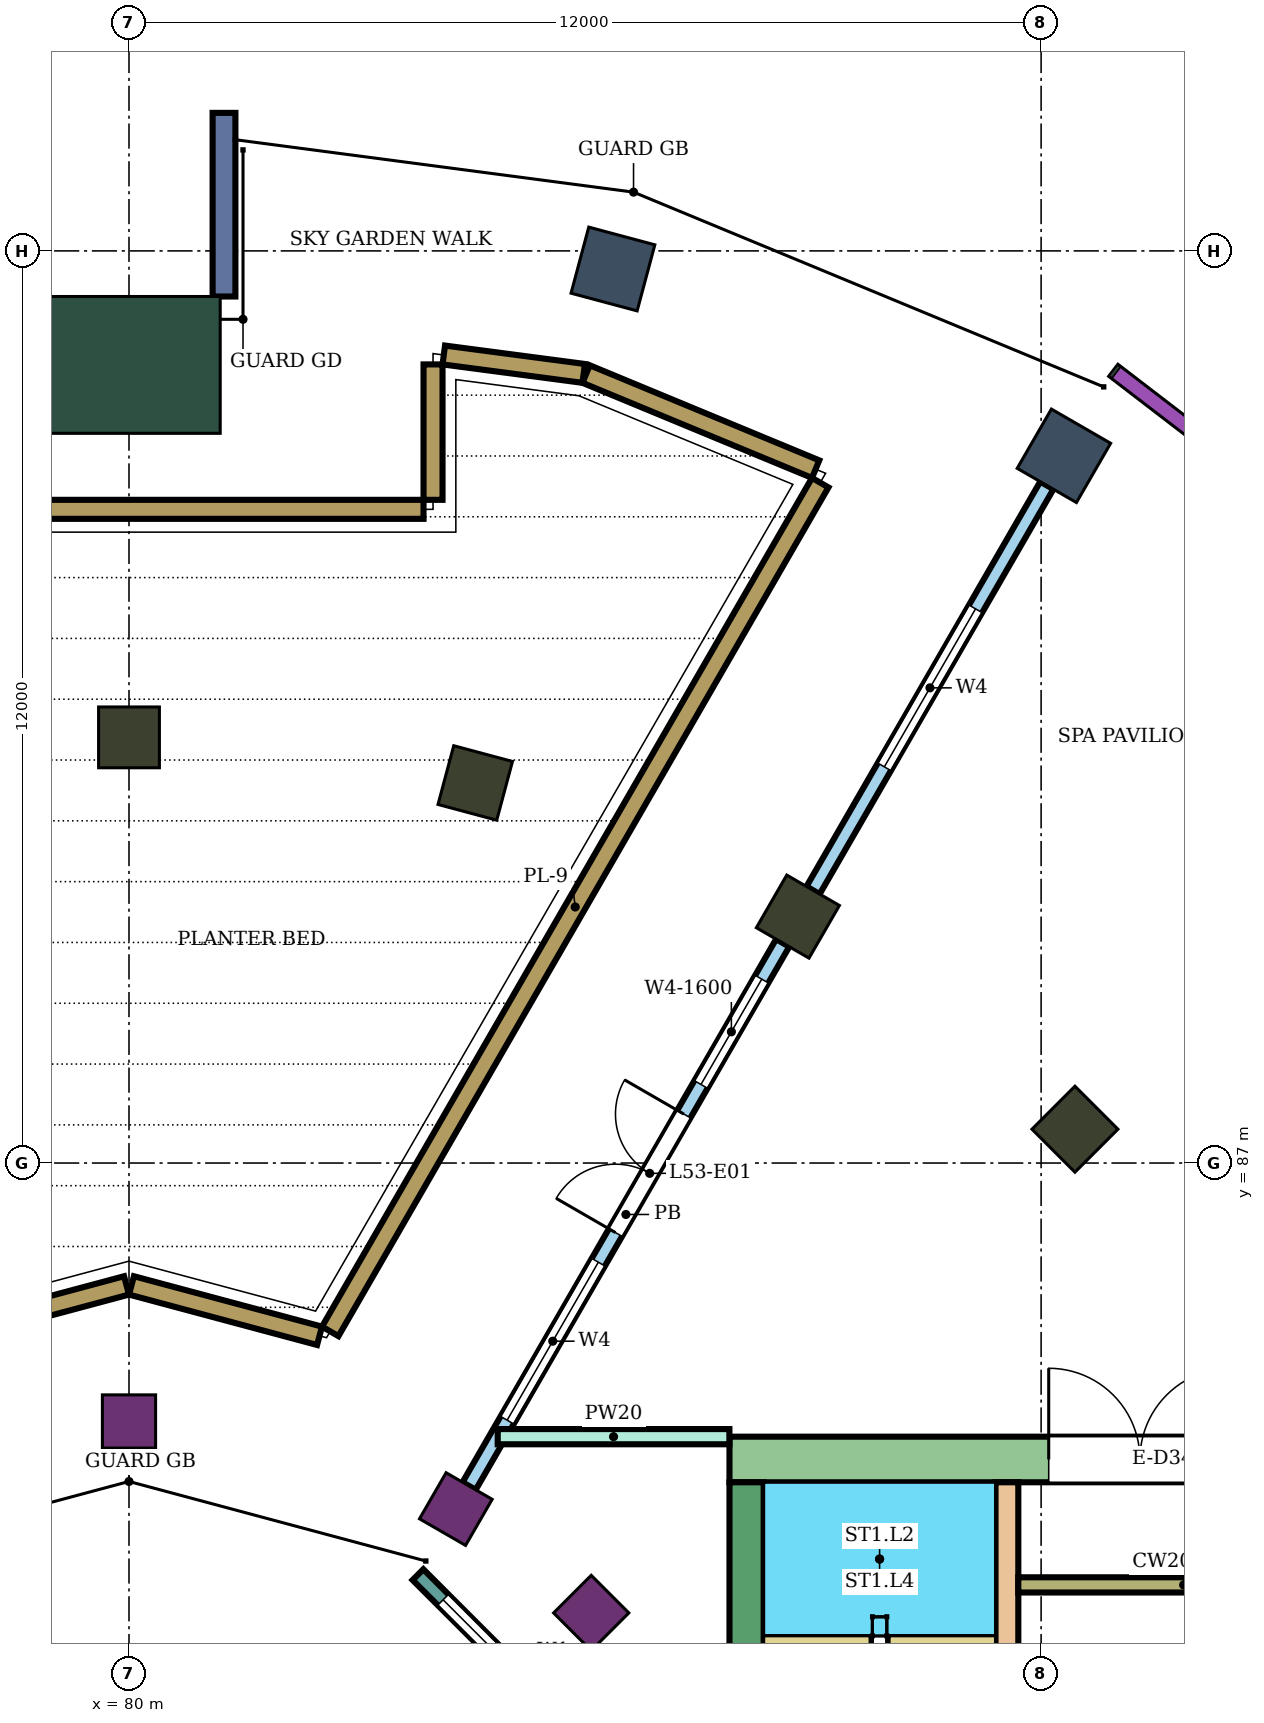
"""IFC4 building model, lengths in metres.
Left out: names, types, materials, properties, quantities, classifications, styles, units other than length and angle.
Written with IfcOpenShell. Run it as: python <this file> out.ifc"""

import sys

from ifc_helpers import new_model, si_unit, direction, frame, frame_2d, origin, origin_2d, place, context, subcontext, project, spatial, rectangle, extrude, element, fill, save


model = new_model("IFC4")
c1 = context("Model", 3, precision=1e-05, world=origin(), true_north=direction((0.0, 1.0)))
c2 = subcontext(c1, "Body", "Model", "MODEL_VIEW")
j1 = project(units=[si_unit("LENGTHUNIT", "METRE"), si_unit("PLANEANGLEUNIT", "RADIAN")], contexts=[c1])
p1 = place(None, origin())
s1 = spatial("IfcSite", under=j1, at=p1, CompositionType="ELEMENT")
p2 = place(p1, origin())
s2 = spatial("IfcBuilding", under=s1, at=p2, CompositionType="ELEMENT")
p3 = place(p2, frame((0.0, 0.0, 229.3)))
s3 = spatial("IfcBuildingStorey", under=s2, at=p3, CompositionType="ELEMENT", Elevation=229.3)
for number, where, z_axis, x_axis in (
    (1, (92.3, 96.304, 0.0), (0.0, 0.0, 1.0), (0.5, 0.866, 0.0)),
    (2, (86.367, 98.762, 0.0), (0.0, 0.0, 1.0), (0.259, 0.966, 0.0)),
):
    element("IfcColumn", number, at=place(p3, frame(where, z_axis=z_axis, x_axis=x_axis)), inside=s3, PredefinedType="COLUMN", context=c2, shape_type="SweptSolid", body=[
        extrude(rectangle(XDim=0.9, YDim=0.9, at=origin_2d()), origin(), (0.0, 0.0, 1.0), 8.0),
    ])
for number, where, z_axis, x_axis in (
    (3, (92.445, 87.445, 0.0), (0.0, 0.0, 1.0), (0.707, 0.707, 0.0)),
    (4, (88.8, 90.242, 0.0), (0.0, 0.0, 1.0), (0.5, 0.866, 0.0)),
    (5, (84.555, 92.0, 0.0), (0.0, 0.0, 1.0), (0.259, 0.966, 0.0)),
    (6, (80.0, 92.6, 0.0), (0.0, 0.0, 1.0), (0.0, 1.0, 0.0)),
):
    element("IfcColumn", number, at=place(p3, frame(where, z_axis=z_axis, x_axis=x_axis)), inside=s3, PredefinedType="COLUMN", context=c2, shape_type="SweptSolid", body=[
        extrude(rectangle(XDim=0.8, YDim=0.8, at=origin_2d()), origin(), (0.0, 0.0, 1.0), 8.0),
    ])
for number, where, z_axis, x_axis in (
    (7, (86.081, 81.081, 0.0), (0.0, 0.0, 1.0), (0.707, 0.707, 0.0)),
    (8, (84.3, 82.448, 0.0), (0.0, 0.0, 1.0), (0.5, 0.866, 0.0)),
    (9, (80.0, 83.6, 0.0), (0.0, 0.0, 1.0), (0.0, 1.0, 0.0)),
):
    element("IfcColumn", number, at=place(p3, frame(where, z_axis=z_axis, x_axis=x_axis)), inside=s3, PredefinedType="COLUMN", context=c2, shape_type="SweptSolid", body=[
        extrude(rectangle(XDim=0.7, YDim=0.7, at=origin_2d()), origin(), (0.0, 0.0, 1.0), 8.0),
    ])
p4 = place(p3, frame((80.0, 97.5, 0.0), z_axis=(0.0, 0.0, 1.0), x_axis=(0.0, 1.0, 0.0)))
e10 = element("IfcColumn", 10, at=p4, inside=s3, PredefinedType="COLUMN", context=c2, shape_type="SweptSolid", body=[
    extrude(rectangle(XDim=1.8, YDim=2.4, at=origin_2d()), origin(), (0.0, 0.0, 1.0), 8.0),
])
p5 = place(p3, frame((87.9, 83.1, 0.0), z_axis=(0.0, 0.0, 1.0), x_axis=(1.0, 0.0, 0.0)))
e11 = element("IfcWall", 11, at=p5, inside=s3, PredefinedType="SHEAR", context=c2, shape_type="SweptSolid", body=[
    extrude(rectangle(XDim=14.9, YDim=0.6, at=frame_2d((7.45, 0.0))), origin(), (0.0, 0.0, 1.0), 7.68),
])
p6 = place(p5, frame((4.2, 0.0, 0.0)))
e12 = element("IfcOpeningElement", 12, at=p6, cuts=e11, PredefinedType="OPENING", context=c2, shape_type="SweptSolid", body=[
    extrude(rectangle(XDim=2.4, YDim=2.4, at=frame_2d((1.2, 1.2))), frame((0.0, 0.31, 0.0), z_axis=(0.0, -1.0, 0.0), x_axis=(1.0, 0.0, 0.0)), (0.0, 0.0, 1.0), 0.62),
])
p7 = place(p3, frame((88.125, 75.0, 0.0), z_axis=(0.0, 0.0, 1.0), x_axis=(0.0, 1.0, 0.0)))
e13 = element("IfcWall", 13, at=p7, inside=s3, PredefinedType="SHEAR", context=c2, shape_type="SweptSolid", body=[
    extrude(rectangle(XDim=7.8, YDim=0.45, at=frame_2d((3.9, 0.0))), origin(), (0.0, 0.0, 1.0), 7.68),
])
p8 = place(p3, frame((91.55, 75.0, 0.0), z_axis=(0.0, 0.0, 1.0), x_axis=(0.0, 1.0, 0.0)))
e14 = element("IfcWall", 14, at=p8, inside=s3, PredefinedType="SHEAR", context=c2, shape_type="SweptSolid", body=[
    extrude(rectangle(XDim=7.8, YDim=0.3, at=frame_2d((3.9, 0.0))), origin(), (0.0, 0.0, 1.0), 7.68),
])
p9 = place(p8, frame((1.85, 0.0, 0.0)))
e15 = element("IfcOpeningElement", 15, at=p9, cuts=e14, PredefinedType="OPENING", context=c2, shape_type="SweptSolid", body=[
    extrude(rectangle(XDim=0.9, YDim=2.1, at=frame_2d((0.45, 1.05))), frame((0.0, 0.16, 0.0), z_axis=(0.0, -1.0, 0.0), x_axis=(1.0, 0.0, 0.0)), (0.0, 0.0, 1.0), 0.32),
])
p10 = place(p3, frame((91.7, 81.45, 0.0), z_axis=(0.0, 0.0, 1.0), x_axis=(1.0, 0.0, 0.0)))
e16 = element("IfcWall", 16, at=p10, inside=s3, PredefinedType="SHEAR", context=c2, shape_type="SweptSolid", body=[
    extrude(rectangle(XDim=4.35, YDim=0.2, at=frame_2d((2.175, 0.0))), origin(), (0.0, 0.0, 1.0), 7.68),
])
p11 = place(p3, frame((81.25, 98.4, 0.0), z_axis=(0.0, 0.0, 1.0), x_axis=(0.0, 1.0, 0.0)))
e17 = element("IfcWall", 17, at=p11, inside=s3, PredefinedType="NOTDEFINED", context=c2, shape_type="SweptSolid", body=[
    extrude(rectangle(XDim=2.416, YDim=0.3, at=frame_2d((1.208, 0.0))), origin(), (0.0, 0.0, 1.0), 8.0),
])
p12 = place(p3, frame((86.585, 78.802, 0.0), z_axis=(0.0, 0.0, 1.0), x_axis=(-0.707106781187, 0.707106781187, 0.0)))
e18 = element("IfcWall", 18, at=p12, inside=s3, PredefinedType="NOTDEFINED", context=c2, shape_type="SweptSolid", body=[
    extrude(rectangle(XDim=3.936, YDim=0.2, at=frame_2d((1.968, 0.0))), origin(), (0.0, 0.0, 1.0), 8.0),
])
p13 = place(p12, frame((0.468, 0.0, 0.9)))
e19 = element("IfcOpeningElement", 19, at=p13, cuts=e18, PredefinedType="OPENING", context=c2, shape_type="SweptSolid", body=[
    extrude(rectangle(XDim=3.0, YDim=2.3, at=frame_2d((1.5, 1.15))), frame((0.0, 0.11, 0.0), z_axis=(0.0, -1.0, 0.0), x_axis=(1.0, 0.0, 0.0)), (0.0, 0.0, 1.0), 0.22),
])
for number, where, z_axis, x_axis in (
    (20, (77.493, 84.727, 0.0), (0.0, 0.0, 1.0), (0.966, 0.259, 0.0)),
    (21, (80.032, 85.39, 0.0), (0.0, 0.0, 1.0), (0.966, -0.259, 0.0)),
):
    element("IfcWall", number, at=place(p3, frame(where, z_axis=z_axis, x_axis=x_axis)), inside=s3, PredefinedType="USERDEFINED", context=c2, shape_type="SweptSolid", body=[
        extrude(rectangle(XDim=2.562, YDim=0.25, at=frame_2d((1.281, 0.0))), origin(), (0.0, 0.0, 1.0), 0.6),
    ])
p14 = place(p3, frame((82.647, 84.785, 0.0), z_axis=(0.0, 0.0, 1.0), x_axis=(0.499992370413, 0.866029808684, 0.0)))
e22 = element("IfcWall", 22, at=p14, inside=s3, PredefinedType="USERDEFINED", context=c2, shape_type="SweptSolid", body=[
    extrude(rectangle(XDim=12.893, YDim=0.25, at=frame_2d((6.446, 0.0))), origin(), (0.0, 0.0, 1.0), 0.6),
])
p15 = place(p3, frame((89.033, 96.129, 0.0), z_axis=(0.0, 0.0, 1.0), x_axis=(-0.923863886655, 0.382721202621, 0.0)))
e23 = element("IfcWall", 23, at=p15, inside=s3, PredefinedType="USERDEFINED", context=c2, shape_type="SweptSolid", body=[
    extrude(rectangle(XDim=3.269, YDim=0.25, at=frame_2d((1.634, 0.0))), origin(), (0.0, 0.0, 1.0), 0.6),
])
p16 = place(p3, frame((85.982, 97.388, 0.0), z_axis=(0.0, 0.0, 1.0), x_axis=(-0.991436829887, 0.130587182926, 0.0)))
e24 = element("IfcWall", 24, at=p16, inside=s3, PredefinedType="USERDEFINED", context=c2, shape_type="SweptSolid", body=[
    extrude(rectangle(XDim=1.856, YDim=0.25, at=frame_2d((0.928, 0.0))), origin(), (0.0, 0.0, 1.0), 0.6),
])
p17 = place(p3, frame((84.0, 97.507, 0.0), z_axis=(0.0, 0.0, 1.0), x_axis=(0.0, -1.0, 0.0)))
e25 = element("IfcWall", 25, at=p17, inside=s3, PredefinedType="USERDEFINED", context=c2, shape_type="SweptSolid", body=[
    extrude(rectangle(XDim=1.781, YDim=0.25, at=frame_2d((0.891, 0.0))), origin(), (0.0, 0.0, 1.0), 0.6),
])
p18 = place(p3, frame((83.875, 95.6, 0.0), z_axis=(0.0, 0.0, 1.0), x_axis=(-1.0, 0.0, 0.0)))
e26 = element("IfcWall", 26, at=p18, inside=s3, PredefinedType="USERDEFINED", context=c2, shape_type="SweptSolid", body=[
    extrude(rectangle(XDim=7.75, YDim=0.25, at=frame_2d((3.875, 0.0))), origin(), (0.0, 0.0, 1.0), 0.6),
])
p19 = place(p3, frame((84.475, 82.751, 0.0), z_axis=(0.0, 0.0, 1.0), x_axis=(0.499996545922, 0.866027397988, 0.0)))
e27 = element("IfcWall", 27, at=p19, inside=s3, PredefinedType="NOTDEFINED", context=c2, shape_type="SweptSolid", body=[
    extrude(rectangle(XDim=8.25, YDim=0.2, at=frame_2d((4.125, 0.0))), origin(), (0.0, 0.0, 1.0), 8.0),
])
p20 = place(p19, frame((1.0, 0.0, 0.3)))
e28 = element("IfcOpeningElement", 28, at=p20, cuts=e27, PredefinedType="OPENING", context=c2, shape_type="SweptSolid", body=[
    extrude(rectangle(XDim=2.4, YDim=3.6, at=frame_2d((1.2, 1.8))), frame((0.0, 0.11, 0.0), z_axis=(0.0, -1.0, 0.0), x_axis=(1.0, 0.0, 0.0)), (0.0, 0.0, 1.0), 0.22),
])
p21 = place(p19, frame((3.85, 0.0, 0.0)))
e29 = element("IfcOpeningElement", 29, at=p21, cuts=e27, PredefinedType="OPENING", context=c2, shape_type="SweptSolid", body=[
    extrude(rectangle(XDim=1.8, YDim=2.4, at=frame_2d((0.9, 1.2))), frame((0.0, 0.11, 0.0), z_axis=(0.0, -1.0, 0.0), x_axis=(1.0, 0.0, 0.0)), (0.0, 0.0, 1.0), 0.22),
])
p22 = place(p19, frame((6.1, 0.0, 0.3)))
e30 = element("IfcOpeningElement", 30, at=p22, cuts=e27, PredefinedType="OPENING", context=c2, shape_type="SweptSolid", body=[
    extrude(rectangle(XDim=1.6, YDim=3.6, at=frame_2d((0.8, 1.8))), frame((0.0, 0.11, 0.0), z_axis=(0.0, -1.0, 0.0), x_axis=(1.0, 0.0, 0.0)), (0.0, 0.0, 1.0), 0.22),
])
p23 = place(p3, frame((89.0, 90.588, 0.0), z_axis=(0.0, 0.0, 1.0), x_axis=(0.499985903289, 0.866033542371, 0.0)))
e31 = element("IfcWall", 31, at=p23, inside=s3, PredefinedType="NOTDEFINED", context=c2, shape_type="SweptSolid", body=[
    extrude(rectangle(XDim=6.15, YDim=0.2, at=frame_2d((3.075, 0.0))), origin(), (0.0, 0.0, 1.0), 8.0),
])
p24 = place(p23, frame((1.875, 0.0, 0.3)))
e32 = element("IfcOpeningElement", 32, at=p24, cuts=e31, PredefinedType="OPENING", context=c2, shape_type="SweptSolid", body=[
    extrude(rectangle(XDim=2.4, YDim=3.6, at=frame_2d((1.2, 1.8))), frame((0.0, 0.11, 0.0), z_axis=(0.0, -1.0, 0.0), x_axis=(1.0, 0.0, 0.0)), (0.0, 0.0, 1.0), 0.22),
])
p25 = place(p3, frame((84.851, 83.4, 0.0), z_axis=(0.0, 0.0, 1.0), x_axis=(1.0, 0.0, 0.0)))
e33 = element("IfcWall", 33, at=p25, inside=s3, PredefinedType="PARTITIONING", context=c2, shape_type="SweptSolid", body=[
    extrude(rectangle(XDim=3.048, YDim=0.2, at=frame_2d((1.524, 0.0))), origin(), (0.0, 0.0, 1.0), 7.55),
])
p26 = place(p13, origin())
e34 = element("IfcWindow", 34, at=p26, inside=s3, PartitioningType="SINGLE_PANEL", PredefinedType="WINDOW", context=c2, shape_type="SweptSolid", body=[
    extrude(rectangle(XDim=3.0, YDim=2.3, at=frame_2d((1.5, 1.15))), frame((0.0, 0.03, 0.0), z_axis=(0.0, -1.0, 0.0), x_axis=(1.0, 0.0, 0.0)), (0.0, 0.0, 1.0), 0.06),
])
fill(e19, e34)
p27 = place(p20, origin())
e35 = element("IfcWindow", 35, at=p27, inside=s3, PartitioningType="SINGLE_PANEL", PredefinedType="WINDOW", context=c2, shape_type="SweptSolid", body=[
    extrude(rectangle(XDim=2.4, YDim=3.6, at=frame_2d((1.2, 1.8))), frame((0.0, 0.03, 0.0), z_axis=(0.0, -1.0, 0.0), x_axis=(1.0, 0.0, 0.0)), (0.0, 0.0, 1.0), 0.06),
])
fill(e28, e35)
p28 = place(p21, origin())
e36 = element("IfcDoor", 36, at=p28, inside=s3, OperationType="DOUBLE_DOOR_SINGLE_SWING", PredefinedType="DOOR", context=c2, shape_type="SweptSolid", body=[
    extrude(rectangle(XDim=1.8, YDim=2.4, at=frame_2d((0.9, 1.2))), frame((0.0, 0.025, 0.0), z_axis=(0.0, -1.0, 0.0), x_axis=(1.0, 0.0, 0.0)), (0.0, 0.0, 1.0), 0.05),
])
fill(e29, e36)
p29 = place(p22, origin())
e37 = element("IfcWindow", 37, at=p29, inside=s3, PartitioningType="SINGLE_PANEL", PredefinedType="WINDOW", context=c2, shape_type="SweptSolid", body=[
    extrude(rectangle(XDim=1.6, YDim=3.6, at=frame_2d((0.8, 1.8))), frame((0.0, 0.03, 0.0), z_axis=(0.0, -1.0, 0.0), x_axis=(1.0, 0.0, 0.0)), (0.0, 0.0, 1.0), 0.06),
])
fill(e30, e37)
p30 = place(p24, origin())
e38 = element("IfcWindow", 38, at=p30, inside=s3, PartitioningType="SINGLE_PANEL", PredefinedType="WINDOW", context=c2, shape_type="SweptSolid", body=[
    extrude(rectangle(XDim=2.4, YDim=3.6, at=frame_2d((1.2, 1.8))), frame((0.0, 0.03, 0.0), z_axis=(0.0, -1.0, 0.0), x_axis=(1.0, 0.0, 0.0)), (0.0, 0.0, 1.0), 0.06),
])
fill(e32, e38)
p31 = place(p6, origin())
e39 = element("IfcDoor", 39, at=p31, inside=s3, OperationType="DOUBLE_DOOR_SINGLE_SWING", PredefinedType="DOOR", context=c2, shape_type="SweptSolid", body=[
    extrude(rectangle(XDim=2.4, YDim=2.4, at=frame_2d((1.2, 1.2))), frame((0.0, 0.025, 0.0), z_axis=(0.0, -1.0, 0.0), x_axis=(1.0, 0.0, 0.0)), (0.0, 0.0, 1.0), 0.05),
])
fill(e12, e39)
save(model, sys.argv[1])
